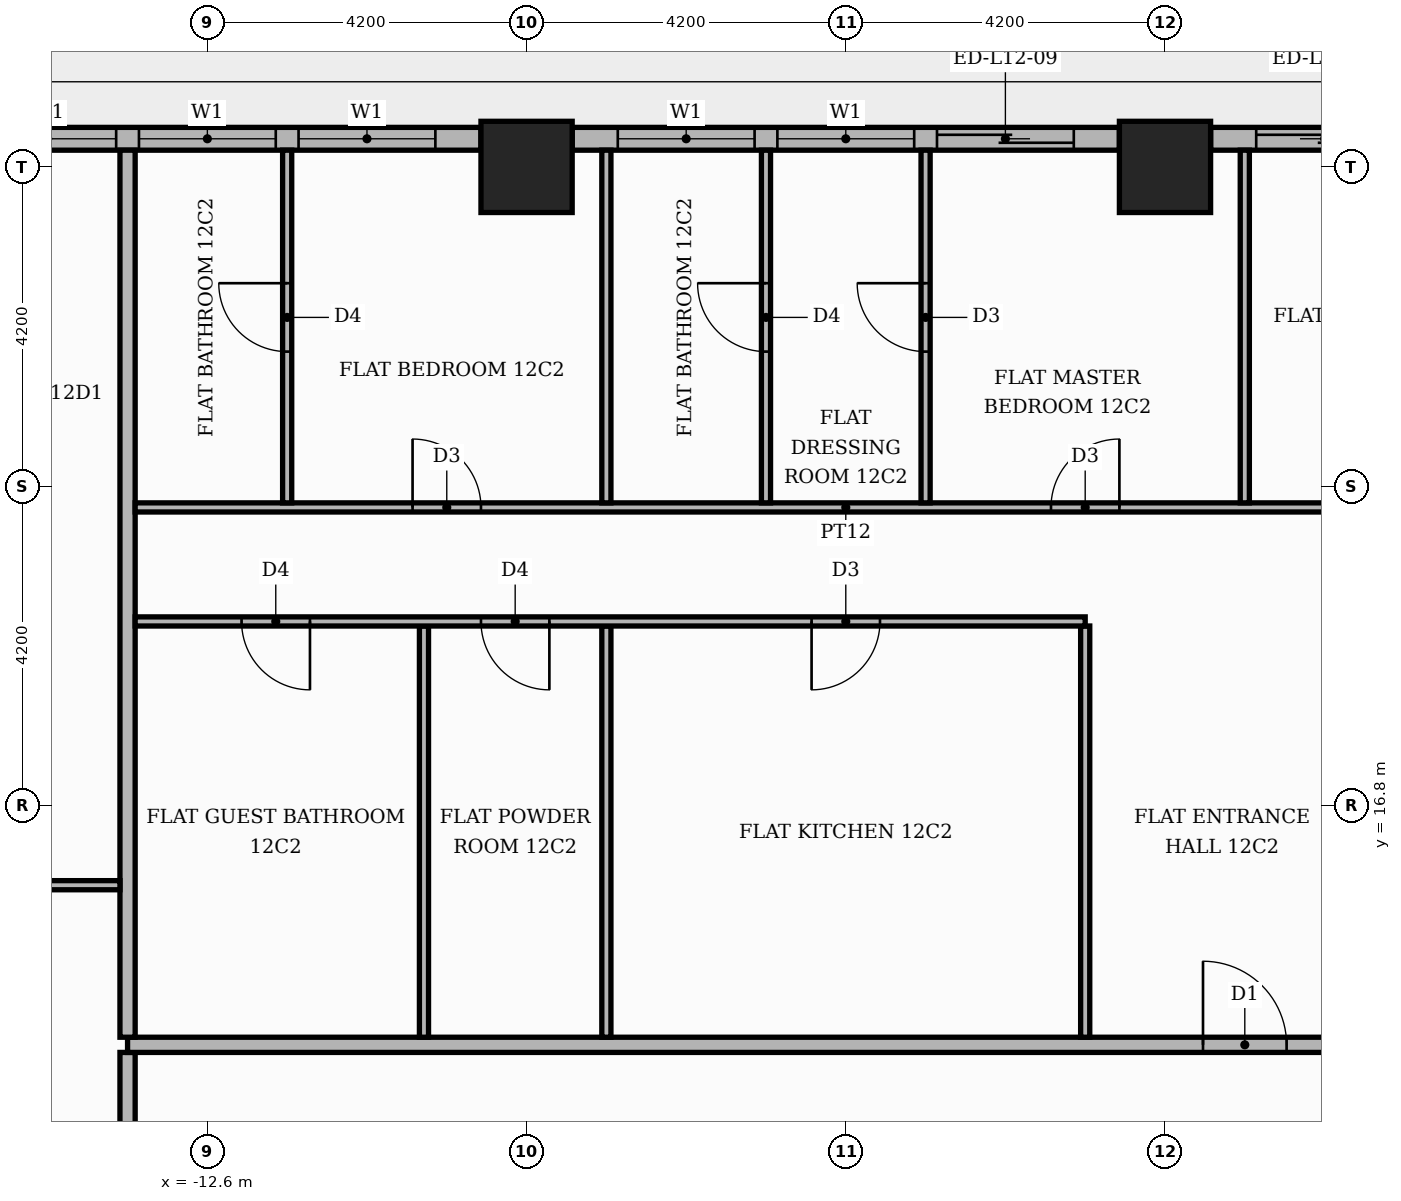
"""IFC4 building model, lengths in metres.
Left out: names, types, materials, properties, quantities, classifications, styles, units other than length and angle.
Written with IfcOpenShell. Run it as: python <this file> out.ifc"""

import sys

from ifc_helpers import new_model, si_unit, direction, frame, frame_2d, origin, origin_2d, place, context, subcontext, project, spatial, rectangle, extrude, element, fill, save


model = new_model("IFC4")
c1 = context("Model", 3, precision=1e-05, world=origin(), true_north=direction((0.0, 1.0)))
c2 = subcontext(c1, "Body", "Model", "MODEL_VIEW")
j1 = project(units=[si_unit("LENGTHUNIT", "METRE"), si_unit("PLANEANGLEUNIT", "RADIAN")], contexts=[c1])
p1 = place(None, origin())
s1 = spatial("IfcSite", under=j1, at=p1, CompositionType="ELEMENT")
p2 = place(p1, origin())
s2 = spatial("IfcBuilding", under=s1, at=p2, CompositionType="ELEMENT")
p3 = place(p2, frame((0.0, 0.0, 54.3)))
s3 = spatial("IfcBuildingStorey", under=s2, at=p3, CompositionType="ELEMENT", Elevation=54.3)
for number, where, z_axis, x_axis in (
    (1, (0.0, 25.2, 0.0), (0.0, 0.0, 1.0), (1.0, 0.0, 0.0)),
    (2, (-8.4, 25.2, 0.0), (0.0, 0.0, 1.0), (1.0, 0.0, 0.0)),
):
    element("IfcColumn", number, at=place(p3, frame(where, z_axis=z_axis, x_axis=x_axis)), inside=s3, PredefinedType="COLUMN", context=c2, shape_type="SweptSolid", body=[
        extrude(rectangle(XDim=1.2, YDim=1.2, at=origin_2d()), origin(), (0.0, 0.0, 1.0), 3.9),
    ])
p4 = place(p3, frame((7.8, 25.57, 0.0), z_axis=(0.0, 0.0, 1.0), x_axis=(-1.0, 0.0, 0.0)))
e3 = element("IfcWall", 3, at=p4, inside=s3, PredefinedType="STANDARD", context=c2, shape_type="SweptSolid", body=[
    extrude(rectangle(XDim=7.2, YDim=0.3, at=frame_2d((3.6, 0.0))), origin(), (0.0, 0.0, 1.0), 3.48),
])
p5 = place(p4, frame((0.6, 0.0, 0.9)))
e4 = element("IfcOpeningElement", 4, at=p5, cuts=e3, PredefinedType="OPENING", context=c2, shape_type="SweptSolid", body=[
    extrude(rectangle(XDim=1.8, YDim=2.1, at=frame_2d((0.9, 1.05))), frame((0.0, 0.16, 0.0), z_axis=(0.0, -1.0, 0.0), x_axis=(1.0, 0.0, 0.0)), (0.0, 0.0, 1.0), 0.32),
])
p6 = place(p4, frame((2.7, 0.0, 0.9)))
e5 = element("IfcOpeningElement", 5, at=p6, cuts=e3, PredefinedType="OPENING", context=c2, shape_type="SweptSolid", body=[
    extrude(rectangle(XDim=1.8, YDim=2.1, at=frame_2d((0.9, 1.05))), frame((0.0, 0.16, 0.0), z_axis=(0.0, -1.0, 0.0), x_axis=(1.0, 0.0, 0.0)), (0.0, 0.0, 1.0), 0.32),
])
p7 = place(p4, frame((4.8, 0.0, 0.0)))
e6 = element("IfcOpeningElement", 6, at=p7, cuts=e3, PredefinedType="OPENING", context=c2, shape_type="SweptSolid", body=[
    extrude(rectangle(XDim=1.8, YDim=2.4, at=frame_2d((0.9, 1.2))), frame((0.0, 0.16, 0.0), z_axis=(0.0, -1.0, 0.0), x_axis=(1.0, 0.0, 0.0)), (0.0, 0.0, 1.0), 0.32),
])
p8 = place(p3, frame((-0.6, 25.57, 0.0), z_axis=(0.0, 0.0, 1.0), x_axis=(-1.0, 0.0, 0.0)))
e7 = element("IfcWall", 7, at=p8, inside=s3, PredefinedType="STANDARD", context=c2, shape_type="SweptSolid", body=[
    extrude(rectangle(XDim=7.2, YDim=0.3, at=frame_2d((3.6, 0.0))), origin(), (0.0, 0.0, 1.0), 3.48),
])
p9 = place(p8, frame((0.6, 0.0, 0.0)))
e8 = element("IfcOpeningElement", 8, at=p9, cuts=e7, PredefinedType="OPENING", context=c2, shape_type="SweptSolid", body=[
    extrude(rectangle(XDim=1.8, YDim=2.4, at=frame_2d((0.9, 1.2))), frame((0.0, 0.16, 0.0), z_axis=(0.0, -1.0, 0.0), x_axis=(1.0, 0.0, 0.0)), (0.0, 0.0, 1.0), 0.32),
])
p10 = place(p8, frame((2.7, 0.0, 0.9)))
e9 = element("IfcOpeningElement", 9, at=p10, cuts=e7, PredefinedType="OPENING", context=c2, shape_type="SweptSolid", body=[
    extrude(rectangle(XDim=1.8, YDim=2.1, at=frame_2d((0.9, 1.05))), frame((0.0, 0.16, 0.0), z_axis=(0.0, -1.0, 0.0), x_axis=(1.0, 0.0, 0.0)), (0.0, 0.0, 1.0), 0.32),
])
p11 = place(p8, frame((4.8, 0.0, 0.9)))
e10 = element("IfcOpeningElement", 10, at=p11, cuts=e7, PredefinedType="OPENING", context=c2, shape_type="SweptSolid", body=[
    extrude(rectangle(XDim=1.8, YDim=2.1, at=frame_2d((0.9, 1.05))), frame((0.0, 0.16, 0.0), z_axis=(0.0, -1.0, 0.0), x_axis=(1.0, 0.0, 0.0)), (0.0, 0.0, 1.0), 0.32),
])
p12 = place(p3, frame((-9.0, 25.57, 0.0), z_axis=(0.0, 0.0, 1.0), x_axis=(-1.0, 0.0, 0.0)))
e11 = element("IfcWall", 11, at=p12, inside=s3, PredefinedType="STANDARD", context=c2, shape_type="SweptSolid", body=[
    extrude(rectangle(XDim=7.2, YDim=0.3, at=frame_2d((3.6, 0.0))), origin(), (0.0, 0.0, 1.0), 3.48),
])
p13 = place(p12, frame((0.6, 0.0, 0.9)))
e12 = element("IfcOpeningElement", 12, at=p13, cuts=e11, PredefinedType="OPENING", context=c2, shape_type="SweptSolid", body=[
    extrude(rectangle(XDim=1.8, YDim=2.1, at=frame_2d((0.9, 1.05))), frame((0.0, 0.16, 0.0), z_axis=(0.0, -1.0, 0.0), x_axis=(1.0, 0.0, 0.0)), (0.0, 0.0, 1.0), 0.32),
])
p14 = place(p12, frame((2.7, 0.0, 0.9)))
e13 = element("IfcOpeningElement", 13, at=p14, cuts=e11, PredefinedType="OPENING", context=c2, shape_type="SweptSolid", body=[
    extrude(rectangle(XDim=1.8, YDim=2.1, at=frame_2d((0.9, 1.05))), frame((0.0, 0.16, 0.0), z_axis=(0.0, -1.0, 0.0), x_axis=(1.0, 0.0, 0.0)), (0.0, 0.0, 1.0), 0.32),
])
p15 = place(p12, frame((4.8, 0.0, 0.9)))
e14 = element("IfcOpeningElement", 14, at=p15, cuts=e11, PredefinedType="OPENING", context=c2, shape_type="SweptSolid", body=[
    extrude(rectangle(XDim=1.8, YDim=2.1, at=frame_2d((0.9, 1.05))), frame((0.0, 0.16, 0.0), z_axis=(0.0, -1.0, 0.0), x_axis=(1.0, 0.0, 0.0)), (0.0, 0.0, 1.0), 0.32),
])
p16 = place(p3, frame((-13.65, 5.35, 0.0), z_axis=(0.0, 0.0, 1.0), x_axis=(0.0, 1.0, 0.0)))
e15 = element("IfcWall", 15, at=p16, inside=s3, PredefinedType="PARTITIONING", context=c2, shape_type="SweptSolid", body=[
    extrude(rectangle(XDim=8.2, YDim=0.2, at=frame_2d((4.1, 0.0))), origin(), (0.0, 0.0, 1.0), 3.48),
])
p17 = place(p16, frame((5.65, 0.0, 0.0)))
e16 = element("IfcOpeningElement", 16, at=p17, cuts=e15, PredefinedType="OPENING", context=c2, shape_type="SweptSolid", body=[
    extrude(rectangle(XDim=1.1, YDim=2.4, at=frame_2d((0.55, 1.2))), frame((0.0, 0.11, 0.0), z_axis=(0.0, -1.0, 0.0), x_axis=(1.0, 0.0, 0.0)), (0.0, 0.0, 1.0), 0.22),
])
p18 = place(p3, frame((-13.65, 13.65, 0.0), z_axis=(0.0, 0.0, 1.0), x_axis=(1.0, 0.0, 0.0)))
e17 = element("IfcWall", 17, at=p18, inside=s3, PredefinedType="PARTITIONING", context=c2, shape_type="SweptSolid", body=[
    extrude(rectangle(XDim=39.07, YDim=0.2, at=frame_2d((19.535, 0.0))), origin(), (0.0, 0.0, 1.0), 3.48),
])
p19 = place(p18, frame((24.65, 0.0, 0.0)))
e18 = element("IfcOpeningElement", 18, at=p19, cuts=e17, PredefinedType="OPENING", context=c2, shape_type="SweptSolid", body=[
    extrude(rectangle(XDim=1.1, YDim=2.4, at=frame_2d((0.55, 1.2))), frame((0.0, 0.11, 0.0), z_axis=(0.0, -1.0, 0.0), x_axis=(1.0, 0.0, 0.0)), (0.0, 0.0, 1.0), 0.22),
])
p20 = place(p18, frame((14.15, 0.0, 0.0)))
e19 = element("IfcOpeningElement", 19, at=p20, cuts=e17, PredefinedType="OPENING", context=c2, shape_type="SweptSolid", body=[
    extrude(rectangle(XDim=1.1, YDim=2.4, at=frame_2d((0.55, 1.2))), frame((0.0, 0.11, 0.0), z_axis=(0.0, -1.0, 0.0), x_axis=(1.0, 0.0, 0.0)), (0.0, 0.0, 1.0), 0.22),
])
p21 = place(p3, frame((-13.65, 13.75, 0.0), z_axis=(0.0, 0.0, 1.0), x_axis=(0.0, 1.0, 0.0)))
e20 = element("IfcWall", 20, at=p21, inside=s3, PredefinedType="PARTITIONING", context=c2, shape_type="SweptSolid", body=[
    extrude(rectangle(XDim=11.67, YDim=0.2, at=frame_2d((5.835, 0.0))), origin(), (0.0, 0.0, 1.0), 3.48),
])
for number, where, z_axis, x_axis in (
    (21, (-9.75, 13.75, 0.0), (0.0, 0.0, 1.0), (0.0, 1.0, 0.0)),
    (22, (-7.35, 13.75, 0.0), (0.0, 0.0, 1.0), (0.0, 1.0, 0.0)),
    (23, (-1.05, 13.75, 0.0), (0.0, 0.0, 1.0), (0.0, 1.0, 0.0)),
):
    element("IfcWall", number, at=place(p3, frame(where, z_axis=z_axis, x_axis=x_axis)), inside=s3, PredefinedType="PARTITIONING", context=c2, shape_type="SweptSolid", body=[
        extrude(rectangle(XDim=5.41, YDim=0.12, at=frame_2d((2.705, 0.0))), origin(), (0.0, 0.0, 1.0), 3.48),
    ])
p22 = place(p3, frame((-19.82, 15.75, 0.0), z_axis=(0.0, 0.0, 1.0), x_axis=(1.0, 0.0, 0.0)))
e24 = element("IfcWall", 24, at=p22, inside=s3, PredefinedType="PARTITIONING", context=c2, shape_type="SweptSolid", body=[
    extrude(rectangle(XDim=6.07, YDim=0.12, at=frame_2d((3.035, 0.0))), origin(), (0.0, 0.0, 1.0), 3.48),
])
p23 = place(p22, frame((2.585, 0.0, 0.0)))
e25 = element("IfcOpeningElement", 25, at=p23, cuts=e24, PredefinedType="OPENING", context=c2, shape_type="SweptSolid", body=[
    extrude(rectangle(XDim=1.0, YDim=2.1, at=frame_2d((0.5, 1.05))), frame((0.0, 0.07, 0.0), z_axis=(0.0, -1.0, 0.0), x_axis=(1.0, 0.0, 0.0)), (0.0, 0.0, 1.0), 0.14),
])
p24 = place(p3, frame((-13.55, 19.22, 0.0), z_axis=(0.0, 0.0, 1.0), x_axis=(1.0, 0.0, 0.0)))
e26 = element("IfcWall", 26, at=p24, inside=s3, PredefinedType="PARTITIONING", context=c2, shape_type="SweptSolid", body=[
    extrude(rectangle(XDim=12.5, YDim=0.12, at=frame_2d((6.25, 0.0))), origin(), (0.0, 0.0, 1.0), 3.48),
])
p25 = place(p24, frame((8.9, 0.0, 0.0)))
e27 = element("IfcOpeningElement", 27, at=p25, cuts=e26, PredefinedType="OPENING", context=c2, shape_type="SweptSolid", body=[
    extrude(rectangle(XDim=0.9, YDim=2.1, at=frame_2d((0.45, 1.05))), frame((0.0, 0.07, 0.0), z_axis=(0.0, -1.0, 0.0), x_axis=(1.0, 0.0, 0.0)), (0.0, 0.0, 1.0), 0.14),
])
p26 = place(p24, frame((4.55, 0.0, 0.0)))
e28 = element("IfcOpeningElement", 28, at=p26, cuts=e26, PredefinedType="OPENING", context=c2, shape_type="SweptSolid", body=[
    extrude(rectangle(XDim=0.9, YDim=2.1, at=frame_2d((0.45, 1.05))), frame((0.0, 0.07, 0.0), z_axis=(0.0, -1.0, 0.0), x_axis=(1.0, 0.0, 0.0)), (0.0, 0.0, 1.0), 0.14),
])
p27 = place(p24, frame((1.4, 0.0, 0.0)))
e29 = element("IfcOpeningElement", 29, at=p27, cuts=e26, PredefinedType="OPENING", context=c2, shape_type="SweptSolid", body=[
    extrude(rectangle(XDim=0.9, YDim=2.1, at=frame_2d((0.45, 1.05))), frame((0.0, 0.07, 0.0), z_axis=(0.0, -1.0, 0.0), x_axis=(1.0, 0.0, 0.0)), (0.0, 0.0, 1.0), 0.14),
])
p28 = place(p3, frame((-13.55, 20.72, 0.0), z_axis=(0.0, 0.0, 1.0), x_axis=(1.0, 0.0, 0.0)))
e30 = element("IfcWall", 30, at=p28, inside=s3, PredefinedType="PARTITIONING", context=c2, shape_type="SweptSolid", body=[
    extrude(rectangle(XDim=18.7, YDim=0.12, at=frame_2d((9.35, 0.0))), origin(), (0.0, 0.0, 1.0), 3.48),
])
p29 = place(p28, frame((16.2, 0.0, 0.0)))
e31 = element("IfcOpeningElement", 31, at=p29, cuts=e30, PredefinedType="OPENING", context=c2, shape_type="SweptSolid", body=[
    extrude(rectangle(XDim=1.0, YDim=2.1, at=frame_2d((0.5, 1.05))), frame((0.0, 0.07, 0.0), z_axis=(0.0, -1.0, 0.0), x_axis=(1.0, 0.0, 0.0)), (0.0, 0.0, 1.0), 0.14),
])
p30 = place(p28, frame((12.05, 0.0, 0.0)))
e32 = element("IfcOpeningElement", 32, at=p30, cuts=e30, PredefinedType="OPENING", context=c2, shape_type="SweptSolid", body=[
    extrude(rectangle(XDim=0.9, YDim=2.1, at=frame_2d((0.45, 1.05))), frame((0.0, 0.07, 0.0), z_axis=(0.0, -1.0, 0.0), x_axis=(1.0, 0.0, 0.0)), (0.0, 0.0, 1.0), 0.14),
])
p31 = place(p28, frame((3.65, 0.0, 0.0)))
e33 = element("IfcOpeningElement", 33, at=p31, cuts=e30, PredefinedType="OPENING", context=c2, shape_type="SweptSolid", body=[
    extrude(rectangle(XDim=0.9, YDim=2.1, at=frame_2d((0.45, 1.05))), frame((0.0, 0.07, 0.0), z_axis=(0.0, -1.0, 0.0), x_axis=(1.0, 0.0, 0.0)), (0.0, 0.0, 1.0), 0.14),
])
p32 = place(p3, frame((-11.55, 20.78, 0.0), z_axis=(0.0, 0.0, 1.0), x_axis=(0.0, 1.0, 0.0)))
e34 = element("IfcWall", 34, at=p32, inside=s3, PredefinedType="PARTITIONING", context=c2, shape_type="SweptSolid", body=[
    extrude(rectangle(XDim=4.64, YDim=0.12, at=frame_2d((2.32, 0.0))), origin(), (0.0, 0.0, 1.0), 3.48),
])
p33 = place(p32, frame((1.99, 0.0, 0.0)))
e35 = element("IfcOpeningElement", 35, at=p33, cuts=e34, PredefinedType="OPENING", context=c2, shape_type="SweptSolid", body=[
    extrude(rectangle(XDim=0.9, YDim=2.1, at=frame_2d((0.45, 1.05))), frame((0.0, 0.07, 0.0), z_axis=(0.0, -1.0, 0.0), x_axis=(1.0, 0.0, 0.0)), (0.0, 0.0, 1.0), 0.14),
])
p34 = place(p3, frame((-7.35, 20.78, 0.0), z_axis=(0.0, 0.0, 1.0), x_axis=(0.0, 1.0, 0.0)))
e36 = element("IfcWall", 36, at=p34, inside=s3, PredefinedType="PARTITIONING", context=c2, shape_type="SweptSolid", body=[
    extrude(rectangle(XDim=4.64, YDim=0.12, at=frame_2d((2.32, 0.0))), origin(), (0.0, 0.0, 1.0), 3.48),
])
p35 = place(p3, frame((-5.25, 20.78, 0.0), z_axis=(0.0, 0.0, 1.0), x_axis=(0.0, 1.0, 0.0)))
e37 = element("IfcWall", 37, at=p35, inside=s3, PredefinedType="PARTITIONING", context=c2, shape_type="SweptSolid", body=[
    extrude(rectangle(XDim=4.64, YDim=0.12, at=frame_2d((2.32, 0.0))), origin(), (0.0, 0.0, 1.0), 3.48),
])
p36 = place(p35, frame((1.99, 0.0, 0.0)))
e38 = element("IfcOpeningElement", 38, at=p36, cuts=e37, PredefinedType="OPENING", context=c2, shape_type="SweptSolid", body=[
    extrude(rectangle(XDim=0.9, YDim=2.1, at=frame_2d((0.45, 1.05))), frame((0.0, 0.07, 0.0), z_axis=(0.0, -1.0, 0.0), x_axis=(1.0, 0.0, 0.0)), (0.0, 0.0, 1.0), 0.14),
])
p37 = place(p3, frame((-3.15, 20.78, 0.0), z_axis=(0.0, 0.0, 1.0), x_axis=(0.0, 1.0, 0.0)))
e39 = element("IfcWall", 39, at=p37, inside=s3, PredefinedType="PARTITIONING", context=c2, shape_type="SweptSolid", body=[
    extrude(rectangle(XDim=4.64, YDim=0.12, at=frame_2d((2.32, 0.0))), origin(), (0.0, 0.0, 1.0), 3.48),
])
p38 = place(p37, frame((1.99, 0.0, 0.0)))
e40 = element("IfcOpeningElement", 40, at=p38, cuts=e39, PredefinedType="OPENING", context=c2, shape_type="SweptSolid", body=[
    extrude(rectangle(XDim=0.9, YDim=2.1, at=frame_2d((0.45, 1.05))), frame((0.0, 0.07, 0.0), z_axis=(0.0, -1.0, 0.0), x_axis=(1.0, 0.0, 0.0)), (0.0, 0.0, 1.0), 0.14),
])
p39 = place(p3, frame((1.05, 20.78, 0.0), z_axis=(0.0, 0.0, 1.0), x_axis=(0.0, 1.0, 0.0)))
e41 = element("IfcWall", 41, at=p39, inside=s3, PredefinedType="PARTITIONING", context=c2, shape_type="SweptSolid", body=[
    extrude(rectangle(XDim=4.64, YDim=0.12, at=frame_2d((2.32, 0.0))), origin(), (0.0, 0.0, 1.0), 3.48),
])
p40 = place(p7, origin())
e42 = element("IfcDoor", 42, at=p40, inside=s3, OperationType="SLIDING_TO_RIGHT", PredefinedType="DOOR", context=c2, shape_type="SweptSolid", body=[
    extrude(rectangle(XDim=1.8, YDim=2.4, at=frame_2d((0.9, 1.2))), frame((0.0, 0.025, 0.0), z_axis=(0.0, -1.0, 0.0), x_axis=(1.0, 0.0, 0.0)), (0.0, 0.0, 1.0), 0.05),
])
fill(e6, e42)
p41 = place(p9, origin())
e43 = element("IfcDoor", 43, at=p41, inside=s3, OperationType="SLIDING_TO_LEFT", PredefinedType="DOOR", context=c2, shape_type="SweptSolid", body=[
    extrude(rectangle(XDim=1.8, YDim=2.4, at=frame_2d((0.9, 1.2))), frame((0.0, 0.025, 0.0), z_axis=(0.0, -1.0, 0.0), x_axis=(1.0, 0.0, 0.0)), (0.0, 0.0, 1.0), 0.05),
])
fill(e8, e43)
p42 = place(p10, origin())
e44 = element("IfcWindow", 44, at=p42, inside=s3, PartitioningType="SINGLE_PANEL", PredefinedType="WINDOW", context=c2, shape_type="SweptSolid", body=[
    extrude(rectangle(XDim=1.8, YDim=2.1, at=frame_2d((0.9, 1.05))), frame((0.0, 0.03, 0.0), z_axis=(0.0, -1.0, 0.0), x_axis=(1.0, 0.0, 0.0)), (0.0, 0.0, 1.0), 0.06),
])
fill(e9, e44)
p43 = place(p11, origin())
e45 = element("IfcWindow", 45, at=p43, inside=s3, PartitioningType="SINGLE_PANEL", PredefinedType="WINDOW", context=c2, shape_type="SweptSolid", body=[
    extrude(rectangle(XDim=1.8, YDim=2.1, at=frame_2d((0.9, 1.05))), frame((0.0, 0.03, 0.0), z_axis=(0.0, -1.0, 0.0), x_axis=(1.0, 0.0, 0.0)), (0.0, 0.0, 1.0), 0.06),
])
fill(e10, e45)
p44 = place(p13, origin())
e46 = element("IfcWindow", 46, at=p44, inside=s3, PartitioningType="SINGLE_PANEL", PredefinedType="WINDOW", context=c2, shape_type="SweptSolid", body=[
    extrude(rectangle(XDim=1.8, YDim=2.1, at=frame_2d((0.9, 1.05))), frame((0.0, 0.03, 0.0), z_axis=(0.0, -1.0, 0.0), x_axis=(1.0, 0.0, 0.0)), (0.0, 0.0, 1.0), 0.06),
])
fill(e12, e46)
p45 = place(p14, origin())
e47 = element("IfcWindow", 47, at=p45, inside=s3, PartitioningType="SINGLE_PANEL", PredefinedType="WINDOW", context=c2, shape_type="SweptSolid", body=[
    extrude(rectangle(XDim=1.8, YDim=2.1, at=frame_2d((0.9, 1.05))), frame((0.0, 0.03, 0.0), z_axis=(0.0, -1.0, 0.0), x_axis=(1.0, 0.0, 0.0)), (0.0, 0.0, 1.0), 0.06),
])
fill(e13, e47)
p46 = place(p15, origin())
e48 = element("IfcWindow", 48, at=p46, inside=s3, PartitioningType="SINGLE_PANEL", PredefinedType="WINDOW", context=c2, shape_type="SweptSolid", body=[
    extrude(rectangle(XDim=1.8, YDim=2.1, at=frame_2d((0.9, 1.05))), frame((0.0, 0.03, 0.0), z_axis=(0.0, -1.0, 0.0), x_axis=(1.0, 0.0, 0.0)), (0.0, 0.0, 1.0), 0.06),
])
fill(e14, e48)
p47 = place(p20, origin())
e49 = element("IfcDoor", 49, at=p47, inside=s3, OperationType="SINGLE_SWING_LEFT", PredefinedType="DOOR", context=c2, shape_type="SweptSolid", body=[
    extrude(rectangle(XDim=1.1, YDim=2.4, at=frame_2d((0.55, 1.2))), frame((0.0, 0.025, 0.0), z_axis=(0.0, -1.0, 0.0), x_axis=(1.0, 0.0, 0.0)), (0.0, 0.0, 1.0), 0.05),
])
fill(e19, e49)
p48 = place(p25, frame((0.9, 0.0, 0.0), z_axis=(0.0, 0.0, 1.0), x_axis=(-1.0, 0.0, 0.0)))
e50 = element("IfcDoor", 50, at=p48, inside=s3, OperationType="SINGLE_SWING_LEFT", PredefinedType="DOOR", context=c2, shape_type="SweptSolid", body=[
    extrude(rectangle(XDim=0.9, YDim=2.1, at=frame_2d((0.45, 1.05))), frame((0.0, 0.025, 0.0), z_axis=(0.0, -1.0, 0.0), x_axis=(1.0, 0.0, 0.0)), (0.0, 0.0, 1.0), 0.05),
])
fill(e27, e50)
p49 = place(p26, frame((0.9, 0.0, 0.0), z_axis=(0.0, 0.0, 1.0), x_axis=(-1.0, 0.0, 0.0)))
e51 = element("IfcDoor", 51, at=p49, inside=s3, OperationType="SINGLE_SWING_RIGHT", PredefinedType="DOOR", context=c2, shape_type="SweptSolid", body=[
    extrude(rectangle(XDim=0.9, YDim=2.1, at=frame_2d((0.45, 1.05))), frame((0.0, 0.025, 0.0), z_axis=(0.0, -1.0, 0.0), x_axis=(1.0, 0.0, 0.0)), (0.0, 0.0, 1.0), 0.05),
])
fill(e28, e51)
p50 = place(p27, frame((0.9, 0.0, 0.0), z_axis=(0.0, 0.0, 1.0), x_axis=(-1.0, 0.0, 0.0)))
e52 = element("IfcDoor", 52, at=p50, inside=s3, OperationType="SINGLE_SWING_RIGHT", PredefinedType="DOOR", context=c2, shape_type="SweptSolid", body=[
    extrude(rectangle(XDim=0.9, YDim=2.1, at=frame_2d((0.45, 1.05))), frame((0.0, 0.025, 0.0), z_axis=(0.0, -1.0, 0.0), x_axis=(1.0, 0.0, 0.0)), (0.0, 0.0, 1.0), 0.05),
])
fill(e29, e52)
p51 = place(p30, origin())
e53 = element("IfcDoor", 53, at=p51, inside=s3, OperationType="SINGLE_SWING_RIGHT", PredefinedType="DOOR", context=c2, shape_type="SweptSolid", body=[
    extrude(rectangle(XDim=0.9, YDim=2.1, at=frame_2d((0.45, 1.05))), frame((0.0, 0.025, 0.0), z_axis=(0.0, -1.0, 0.0), x_axis=(1.0, 0.0, 0.0)), (0.0, 0.0, 1.0), 0.05),
])
fill(e32, e53)
p52 = place(p38, origin())
e54 = element("IfcDoor", 54, at=p52, inside=s3, OperationType="SINGLE_SWING_RIGHT", PredefinedType="DOOR", context=c2, shape_type="SweptSolid", body=[
    extrude(rectangle(XDim=0.9, YDim=2.1, at=frame_2d((0.45, 1.05))), frame((0.0, 0.025, 0.0), z_axis=(0.0, -1.0, 0.0), x_axis=(1.0, 0.0, 0.0)), (0.0, 0.0, 1.0), 0.05),
])
fill(e40, e54)
p53 = place(p36, origin())
e55 = element("IfcDoor", 55, at=p53, inside=s3, OperationType="SINGLE_SWING_RIGHT", PredefinedType="DOOR", context=c2, shape_type="SweptSolid", body=[
    extrude(rectangle(XDim=0.9, YDim=2.1, at=frame_2d((0.45, 1.05))), frame((0.0, 0.025, 0.0), z_axis=(0.0, -1.0, 0.0), x_axis=(1.0, 0.0, 0.0)), (0.0, 0.0, 1.0), 0.05),
])
fill(e38, e55)
p54 = place(p31, origin())
e56 = element("IfcDoor", 56, at=p54, inside=s3, OperationType="SINGLE_SWING_LEFT", PredefinedType="DOOR", context=c2, shape_type="SweptSolid", body=[
    extrude(rectangle(XDim=0.9, YDim=2.1, at=frame_2d((0.45, 1.05))), frame((0.0, 0.025, 0.0), z_axis=(0.0, -1.0, 0.0), x_axis=(1.0, 0.0, 0.0)), (0.0, 0.0, 1.0), 0.05),
])
fill(e33, e56)
p55 = place(p33, origin())
e57 = element("IfcDoor", 57, at=p55, inside=s3, OperationType="SINGLE_SWING_RIGHT", PredefinedType="DOOR", context=c2, shape_type="SweptSolid", body=[
    extrude(rectangle(XDim=0.9, YDim=2.1, at=frame_2d((0.45, 1.05))), frame((0.0, 0.025, 0.0), z_axis=(0.0, -1.0, 0.0), x_axis=(1.0, 0.0, 0.0)), (0.0, 0.0, 1.0), 0.05),
])
fill(e35, e57)
save(model, sys.argv[1])
